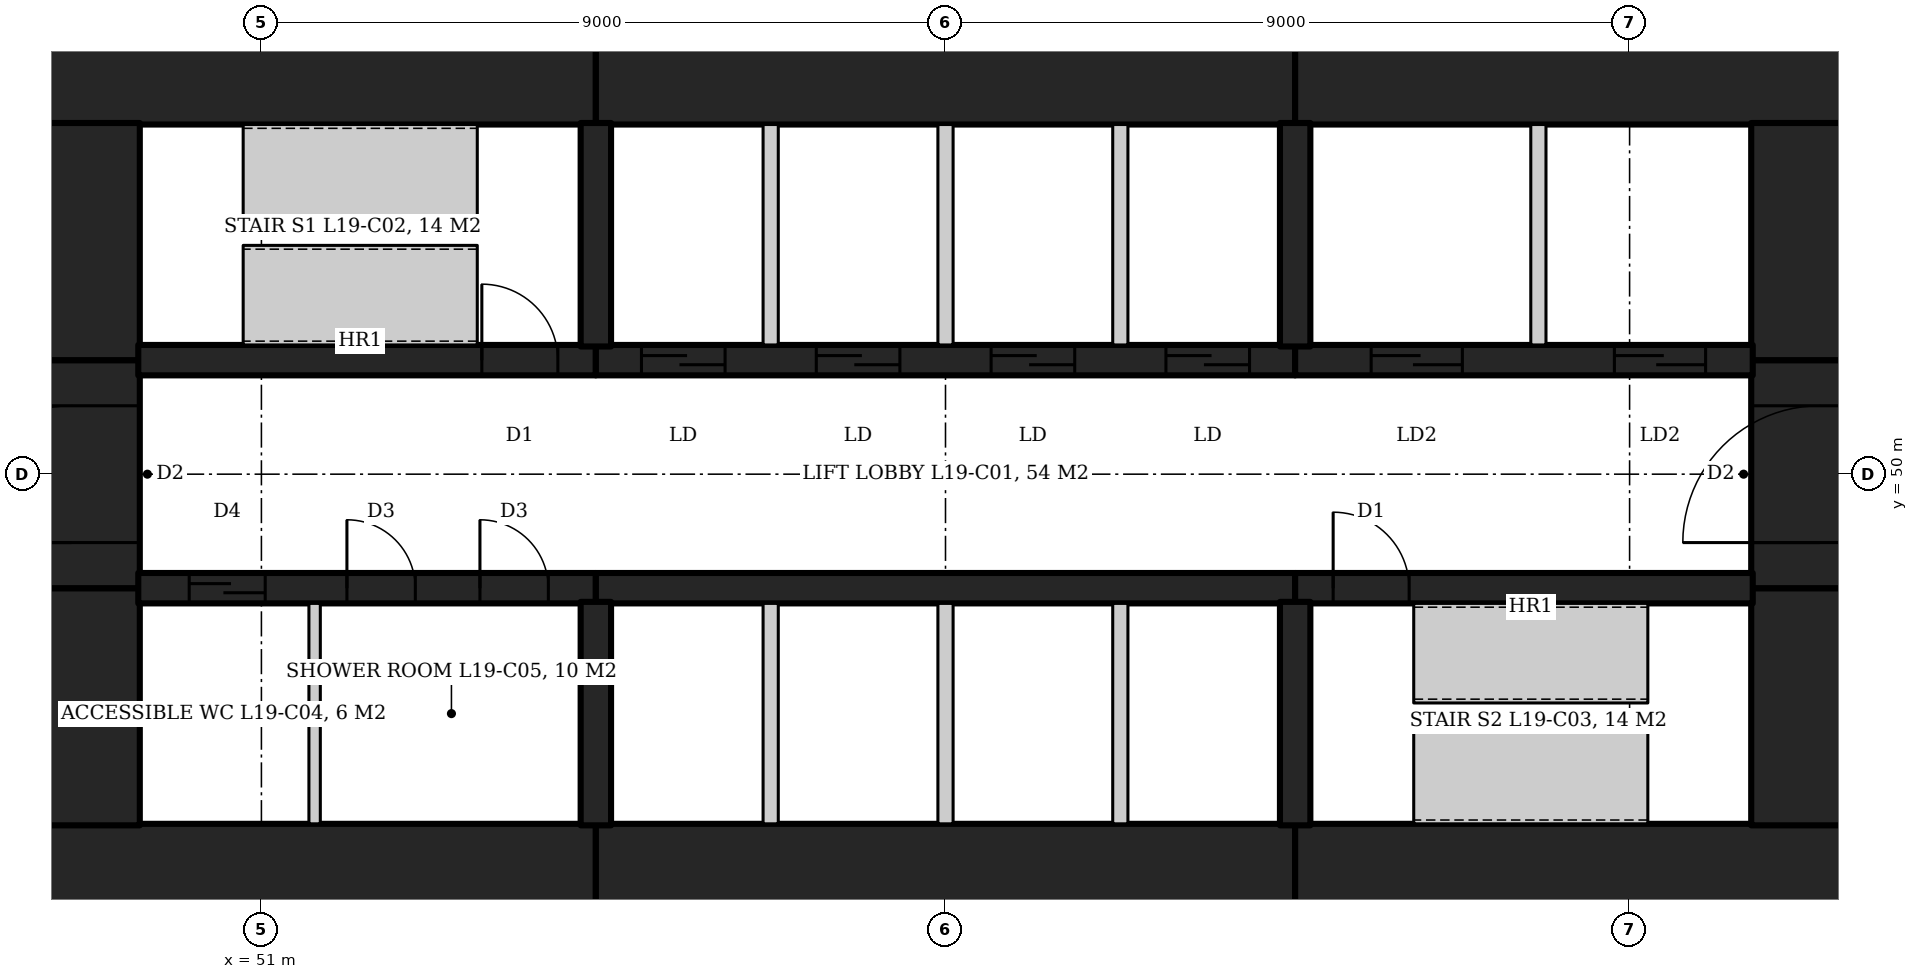
"""IFC4 building model, lengths in metres.
Left out: names, types, materials, properties, quantities, classifications, styles, units other than length and angle.
Written with IfcOpenShell. Run it as: python <this file> out.ifc"""

import sys

from ifc_helpers import new_model, si_unit, direction, frame, frame_2d, origin, place, context, subcontext, project, spatial, rectangle, extrude, element, fill, save


model = new_model("IFC4")
c1 = context("Model", 3, precision=1e-05, world=origin(), true_north=direction((0.0, 1.0)))
c2 = subcontext(c1, "Body", "Model", "MODEL_VIEW")
j1 = project(units=[si_unit("LENGTHUNIT", "METRE"), si_unit("PLANEANGLEUNIT", "RADIAN")], contexts=[c1])
p1 = place(None, origin())
s1 = spatial("IfcSite", under=j1, at=p1, CompositionType="ELEMENT")
p2 = place(p1, origin())
s2 = spatial("IfcBuilding", under=s1, at=p2, CompositionType="ELEMENT")
p3 = place(p2, frame((0.0, 0.0, 80.6)))
s3 = spatial("IfcBuildingStorey", under=s2, at=p3, CompositionType="ELEMENT", Elevation=80.6)
p4 = place(p3, frame((47.6, 55.5, 0.0), z_axis=(0.0, 0.0, 1.0), x_axis=(1.0, 0.0, 0.0)))
e1 = element("IfcWall", 1, at=p4, inside=s3, PredefinedType="SHEAR", context=c2, shape_type="SweptSolid", body=[
    extrude(rectangle(XDim=7.8, YDim=1.8, at=frame_2d((3.9, 0.0))), origin(), (0.0, 0.0, 1.0), 4.2),
])
p5 = place(p3, frame((55.4, 55.5, 0.0), z_axis=(0.0, 0.0, 1.0), x_axis=(1.0, 0.0, 0.0)))
e2 = element("IfcWall", 2, at=p5, inside=s3, PredefinedType="SHEAR", context=c2, shape_type="SweptSolid", body=[
    extrude(rectangle(XDim=9.2, YDim=1.8, at=frame_2d((4.6, 0.0))), origin(), (0.0, 0.0, 1.0), 4.2),
])
for number, where, z_axis, x_axis in (
    (3, (64.6, 55.5, 0.0), (0.0, 0.0, 1.0), (1.0, 0.0, 0.0)),
    (4, (47.6, 44.5, 0.0), (0.0, 0.0, 1.0), (1.0, 0.0, 0.0)),
):
    element("IfcWall", number, at=place(p3, frame(where, z_axis=z_axis, x_axis=x_axis)), inside=s3, PredefinedType="SHEAR", context=c2, shape_type="SweptSolid", body=[
        extrude(rectangle(XDim=7.8, YDim=1.8, at=frame_2d((3.9, 0.0))), origin(), (0.0, 0.0, 1.0), 4.2),
    ])
p6 = place(p3, frame((55.4, 44.5, 0.0), z_axis=(0.0, 0.0, 1.0), x_axis=(1.0, 0.0, 0.0)))
e5 = element("IfcWall", 5, at=p6, inside=s3, PredefinedType="SHEAR", context=c2, shape_type="SweptSolid", body=[
    extrude(rectangle(XDim=9.2, YDim=1.8, at=frame_2d((4.6, 0.0))), origin(), (0.0, 0.0, 1.0), 4.2),
])
p7 = place(p3, frame((64.6, 44.5, 0.0), z_axis=(0.0, 0.0, 1.0), x_axis=(1.0, 0.0, 0.0)))
e6 = element("IfcWall", 6, at=p7, inside=s3, PredefinedType="SHEAR", context=c2, shape_type="SweptSolid", body=[
    extrude(rectangle(XDim=7.8, YDim=1.8, at=frame_2d((3.9, 0.0))), origin(), (0.0, 0.0, 1.0), 4.2),
])
p8 = place(p3, frame((71.5, 45.38, 0.0), z_axis=(0.0, 0.0, 1.0), x_axis=(0.0, 1.0, 0.0)))
e7 = element("IfcWall", 7, at=p8, inside=s3, PredefinedType="SHEAR", context=c2, shape_type="SweptSolid", body=[
    extrude(rectangle(XDim=3.12, YDim=1.8, at=frame_2d((1.56, 0.0))), origin(), (0.0, 0.0, 1.0), 4.2),
])
p9 = place(p3, frame((71.5, 48.5, 0.0), z_axis=(0.0, 0.0, 1.0), x_axis=(0.0, 1.0, 0.0)))
e8 = element("IfcWall", 8, at=p9, inside=s3, PredefinedType="SHEAR", context=c2, shape_type="SweptSolid", body=[
    extrude(rectangle(XDim=3.0, YDim=1.8, at=frame_2d((1.5, 0.0))), origin(), (0.0, 0.0, 1.0), 4.2),
])
p10 = place(p9, frame((0.6, 0.0, 0.0)))
e9 = element("IfcOpeningElement", 9, at=p10, cuts=e8, PredefinedType="OPENING", context=c2, shape_type="SweptSolid", body=[
    extrude(rectangle(XDim=1.8, YDim=2.1, at=frame_2d((0.9, 1.05))), frame((0.0, 0.91, 0.0), z_axis=(0.0, -1.0, 0.0), x_axis=(1.0, 0.0, 0.0)), (0.0, 0.0, 1.0), 1.82),
])
for number, where, z_axis, x_axis in (
    (10, (71.5, 51.5, 0.0), (0.0, 0.0, 1.0), (0.0, 1.0, 0.0)),
    (11, (48.5, 45.38, 0.0), (0.0, 0.0, 1.0), (0.0, 1.0, 0.0)),
):
    element("IfcWall", number, at=place(p3, frame(where, z_axis=z_axis, x_axis=x_axis)), inside=s3, PredefinedType="SHEAR", context=c2, shape_type="SweptSolid", body=[
        extrude(rectangle(XDim=3.12, YDim=1.8, at=frame_2d((1.56, 0.0))), origin(), (0.0, 0.0, 1.0), 4.2),
    ])
p11 = place(p3, frame((48.5, 48.5, 0.0), z_axis=(0.0, 0.0, 1.0), x_axis=(0.0, 1.0, 0.0)))
e12 = element("IfcWall", 12, at=p11, inside=s3, PredefinedType="SHEAR", context=c2, shape_type="SweptSolid", body=[
    extrude(rectangle(XDim=3.0, YDim=1.8, at=frame_2d((1.5, 0.0))), origin(), (0.0, 0.0, 1.0), 4.2),
])
p12 = place(p11, frame((0.6, 0.0, 0.0)))
e13 = element("IfcOpeningElement", 13, at=p12, cuts=e12, PredefinedType="OPENING", context=c2, shape_type="SweptSolid", body=[
    extrude(rectangle(XDim=1.8, YDim=2.1, at=frame_2d((0.9, 1.05))), frame((0.0, 0.91, 0.0), z_axis=(0.0, -1.0, 0.0), x_axis=(1.0, 0.0, 0.0)), (0.0, 0.0, 1.0), 1.82),
])
p13 = place(p3, frame((48.5, 51.5, 0.0), z_axis=(0.0, 0.0, 1.0), x_axis=(0.0, 1.0, 0.0)))
e14 = element("IfcWall", 14, at=p13, inside=s3, PredefinedType="SHEAR", context=c2, shape_type="SweptSolid", body=[
    extrude(rectangle(XDim=3.12, YDim=1.8, at=frame_2d((1.56, 0.0))), origin(), (0.0, 0.0, 1.0), 4.2),
])
p14 = place(p3, frame((49.38, 51.5, 0.0), z_axis=(0.0, 0.0, 1.0), x_axis=(1.0, 0.0, 0.0)))
e15 = element("IfcWall", 15, at=p14, inside=s3, PredefinedType="SHEAR", context=c2, shape_type="SweptSolid", body=[
    extrude(rectangle(XDim=6.02, YDim=0.4, at=frame_2d((3.01, 0.0))), origin(), (0.0, 0.0, 1.0), 4.2),
])
p15 = place(p14, frame((4.52, 0.0, 0.0)))
e16 = element("IfcOpeningElement", 16, at=p15, cuts=e15, PredefinedType="OPENING", context=c2, shape_type="SweptSolid", body=[
    extrude(rectangle(XDim=1.0, YDim=2.1, at=frame_2d((0.5, 1.05))), frame((0.0, 0.21, 0.0), z_axis=(0.0, -1.0, 0.0), x_axis=(1.0, 0.0, 0.0)), (0.0, 0.0, 1.0), 0.42),
])
p16 = place(p3, frame((55.4, 51.5, 0.0), z_axis=(0.0, 0.0, 1.0), x_axis=(1.0, 0.0, 0.0)))
e17 = element("IfcWall", 17, at=p16, inside=s3, PredefinedType="SHEAR", context=c2, shape_type="SweptSolid", body=[
    extrude(rectangle(XDim=9.2, YDim=0.4, at=frame_2d((4.6, 0.0))), origin(), (0.0, 0.0, 1.0), 4.2),
])
p17 = place(p16, frame((0.6, 0.0, 0.0)))
e18 = element("IfcOpeningElement", 18, at=p17, cuts=e17, PredefinedType="OPENING", context=c2, shape_type="SweptSolid", body=[
    extrude(rectangle(XDim=1.1, YDim=2.1, at=frame_2d((0.55, 1.05))), frame((0.0, 0.21, 0.0), z_axis=(0.0, -1.0, 0.0), x_axis=(1.0, 0.0, 0.0)), (0.0, 0.0, 1.0), 0.42),
])
p18 = place(p16, frame((2.9, 0.0, 0.0)))
e19 = element("IfcOpeningElement", 19, at=p18, cuts=e17, PredefinedType="OPENING", context=c2, shape_type="SweptSolid", body=[
    extrude(rectangle(XDim=1.1, YDim=2.1, at=frame_2d((0.55, 1.05))), frame((0.0, 0.21, 0.0), z_axis=(0.0, -1.0, 0.0), x_axis=(1.0, 0.0, 0.0)), (0.0, 0.0, 1.0), 0.42),
])
p19 = place(p16, frame((5.2, 0.0, 0.0)))
e20 = element("IfcOpeningElement", 20, at=p19, cuts=e17, PredefinedType="OPENING", context=c2, shape_type="SweptSolid", body=[
    extrude(rectangle(XDim=1.1, YDim=2.1, at=frame_2d((0.55, 1.05))), frame((0.0, 0.21, 0.0), z_axis=(0.0, -1.0, 0.0), x_axis=(1.0, 0.0, 0.0)), (0.0, 0.0, 1.0), 0.42),
])
p20 = place(p16, frame((7.5, 0.0, 0.0)))
e21 = element("IfcOpeningElement", 21, at=p20, cuts=e17, PredefinedType="OPENING", context=c2, shape_type="SweptSolid", body=[
    extrude(rectangle(XDim=1.1, YDim=2.1, at=frame_2d((0.55, 1.05))), frame((0.0, 0.21, 0.0), z_axis=(0.0, -1.0, 0.0), x_axis=(1.0, 0.0, 0.0)), (0.0, 0.0, 1.0), 0.42),
])
p21 = place(p3, frame((64.6, 51.5, 0.0), z_axis=(0.0, 0.0, 1.0), x_axis=(1.0, 0.0, 0.0)))
e22 = element("IfcWall", 22, at=p21, inside=s3, PredefinedType="SHEAR", context=c2, shape_type="SweptSolid", body=[
    extrude(rectangle(XDim=6.02, YDim=0.4, at=frame_2d((3.01, 0.0))), origin(), (0.0, 0.0, 1.0), 4.2),
])
p22 = place(p21, frame((1.0, 0.0, 0.0)))
e23 = element("IfcOpeningElement", 23, at=p22, cuts=e22, PredefinedType="OPENING", context=c2, shape_type="SweptSolid", body=[
    extrude(rectangle(XDim=1.2, YDim=2.1, at=frame_2d((0.6, 1.05))), frame((0.0, 0.21, 0.0), z_axis=(0.0, -1.0, 0.0), x_axis=(1.0, 0.0, 0.0)), (0.0, 0.0, 1.0), 0.42),
])
p23 = place(p21, frame((4.2, 0.0, 0.0)))
e24 = element("IfcOpeningElement", 24, at=p23, cuts=e22, PredefinedType="OPENING", context=c2, shape_type="SweptSolid", body=[
    extrude(rectangle(XDim=1.2, YDim=2.1, at=frame_2d((0.6, 1.05))), frame((0.0, 0.21, 0.0), z_axis=(0.0, -1.0, 0.0), x_axis=(1.0, 0.0, 0.0)), (0.0, 0.0, 1.0), 0.42),
])
p24 = place(p3, frame((49.38, 48.5, 0.0), z_axis=(0.0, 0.0, 1.0), x_axis=(1.0, 0.0, 0.0)))
e25 = element("IfcWall", 25, at=p24, inside=s3, PredefinedType="SHEAR", context=c2, shape_type="SweptSolid", body=[
    extrude(rectangle(XDim=6.02, YDim=0.4, at=frame_2d((3.01, 0.0))), origin(), (0.0, 0.0, 1.0), 4.2),
])
p25 = place(p24, frame((0.67, 0.0, 0.0)))
e26 = element("IfcOpeningElement", 26, at=p25, cuts=e25, PredefinedType="OPENING", context=c2, shape_type="SweptSolid", body=[
    extrude(rectangle(XDim=1.0, YDim=2.1, at=frame_2d((0.5, 1.05))), frame((0.0, 0.21, 0.0), z_axis=(0.0, -1.0, 0.0), x_axis=(1.0, 0.0, 0.0)), (0.0, 0.0, 1.0), 0.42),
])
p26 = place(p24, frame((2.745, 0.0, 0.0)))
e27 = element("IfcOpeningElement", 27, at=p26, cuts=e25, PredefinedType="OPENING", context=c2, shape_type="SweptSolid", body=[
    extrude(rectangle(XDim=0.9, YDim=2.1, at=frame_2d((0.45, 1.05))), frame((0.0, 0.21, 0.0), z_axis=(0.0, -1.0, 0.0), x_axis=(1.0, 0.0, 0.0)), (0.0, 0.0, 1.0), 0.42),
])
p27 = place(p24, frame((4.495, 0.0, 0.0)))
e28 = element("IfcOpeningElement", 28, at=p27, cuts=e25, PredefinedType="OPENING", context=c2, shape_type="SweptSolid", body=[
    extrude(rectangle(XDim=0.9, YDim=2.1, at=frame_2d((0.45, 1.05))), frame((0.0, 0.21, 0.0), z_axis=(0.0, -1.0, 0.0), x_axis=(1.0, 0.0, 0.0)), (0.0, 0.0, 1.0), 0.42),
])
p28 = place(p3, frame((55.4, 48.5, 0.0), z_axis=(0.0, 0.0, 1.0), x_axis=(1.0, 0.0, 0.0)))
e29 = element("IfcWall", 29, at=p28, inside=s3, PredefinedType="SHEAR", context=c2, shape_type="SweptSolid", body=[
    extrude(rectangle(XDim=9.2, YDim=0.4, at=frame_2d((4.6, 0.0))), origin(), (0.0, 0.0, 1.0), 4.2),
])
p29 = place(p3, frame((64.6, 48.5, 0.0), z_axis=(0.0, 0.0, 1.0), x_axis=(1.0, 0.0, 0.0)))
e30 = element("IfcWall", 30, at=p29, inside=s3, PredefinedType="SHEAR", context=c2, shape_type="SweptSolid", body=[
    extrude(rectangle(XDim=6.02, YDim=0.4, at=frame_2d((3.01, 0.0))), origin(), (0.0, 0.0, 1.0), 4.2),
])
p30 = place(p29, frame((0.5, 0.0, 0.0)))
e31 = element("IfcOpeningElement", 31, at=p30, cuts=e30, PredefinedType="OPENING", context=c2, shape_type="SweptSolid", body=[
    extrude(rectangle(XDim=1.0, YDim=2.1, at=frame_2d((0.5, 1.05))), frame((0.0, 0.21, 0.0), z_axis=(0.0, -1.0, 0.0), x_axis=(1.0, 0.0, 0.0)), (0.0, 0.0, 1.0), 0.42),
])
for number, where, z_axis, x_axis in (
    (32, (55.4, 51.68, 0.0), (0.0, 0.0, 1.0), (0.0, 1.0, 0.0)),
    (33, (64.6, 51.68, 0.0), (0.0, 0.0, 1.0), (0.0, 1.0, 0.0)),
    (34, (55.4, 48.32, 0.0), (0.0, 0.0, 1.0), (0.0, -1.0, 0.0)),
    (35, (64.6, 48.32, 0.0), (0.0, 0.0, 1.0), (0.0, -1.0, 0.0)),
):
    element("IfcWall", number, at=place(p3, frame(where, z_axis=z_axis, x_axis=x_axis)), inside=s3, PredefinedType="SHEAR", context=c2, shape_type="SweptSolid", body=[
        extrude(rectangle(XDim=2.94, YDim=0.4, at=frame_2d((1.47, 0.0))), origin(), (0.0, 0.0, 1.0), 4.2),
    ])
for number, where, z_axis, x_axis in (
    (36, (57.7, 51.7, 0.0), (0.0, 0.0, 1.0), (0.0, 1.0, 0.0)),
    (37, (60.0, 51.7, 0.0), (0.0, 0.0, 1.0), (0.0, 1.0, 0.0)),
    (38, (62.3, 51.7, 0.0), (0.0, 0.0, 1.0), (0.0, 1.0, 0.0)),
    (39, (57.7, 45.4, 0.0), (0.0, 0.0, 1.0), (0.0, 1.0, 0.0)),
    (40, (60.0, 45.4, 0.0), (0.0, 0.0, 1.0), (0.0, 1.0, 0.0)),
    (41, (62.3, 45.4, 0.0), (0.0, 0.0, 1.0), (0.0, 1.0, 0.0)),
    (42, (67.8, 51.7, 0.0), (0.0, 0.0, 1.0), (0.0, 1.0, 0.0)),
):
    element("IfcWall", number, at=place(p3, frame(where, z_axis=z_axis, x_axis=x_axis)), inside=s3, PredefinedType="PARTITIONING", context=c2, shape_type="SweptSolid", body=[
        extrude(rectangle(XDim=2.9, YDim=0.2, at=frame_2d((1.45, 0.0))), origin(), (0.0, 0.0, 1.0), 4.2),
    ])
p31 = place(p3, frame((51.7, 45.4, 0.0), z_axis=(0.0, 0.0, 1.0), x_axis=(0.0, 1.0, 0.0)))
e43 = element("IfcWall", 43, at=p31, inside=s3, PredefinedType="PARTITIONING", context=c2, shape_type="SweptSolid", body=[
    extrude(rectangle(XDim=2.9, YDim=0.15, at=frame_2d((1.45, 0.0))), origin(), (0.0, 0.0, 1.0), 4.04),
])
p32 = place(p15, origin())
e44 = element("IfcDoor", 44, at=p32, inside=s3, OperationType="SINGLE_SWING_LEFT", PredefinedType="DOOR", context=c2, shape_type="SweptSolid", body=[
    extrude(rectangle(XDim=1.0, YDim=2.1, at=frame_2d((0.5, 1.05))), frame((0.0, 0.025, 0.0), z_axis=(0.0, -1.0, 0.0), x_axis=(1.0, 0.0, 0.0)), (0.0, 0.0, 1.0), 0.05),
])
fill(e16, e44)
p33 = place(p30, origin())
e45 = element("IfcDoor", 45, at=p33, inside=s3, OperationType="SINGLE_SWING_LEFT", PredefinedType="DOOR", context=c2, shape_type="SweptSolid", body=[
    extrude(rectangle(XDim=1.0, YDim=2.1, at=frame_2d((0.5, 1.05))), frame((0.0, 0.025, 0.0), z_axis=(0.0, -1.0, 0.0), x_axis=(1.0, 0.0, 0.0)), (0.0, 0.0, 1.0), 0.05),
])
fill(e31, e45)
p34 = place(p22, origin())
e46 = element("IfcDoor", 46, at=p34, inside=s3, OperationType="SLIDING_TO_LEFT", PredefinedType="DOOR", context=c2, shape_type="SweptSolid", body=[
    extrude(rectangle(XDim=1.2, YDim=2.1, at=frame_2d((0.6, 1.05))), frame((0.0, 0.025, 0.0), z_axis=(0.0, -1.0, 0.0), x_axis=(1.0, 0.0, 0.0)), (0.0, 0.0, 1.0), 0.05),
])
fill(e23, e46)
p35 = place(p23, origin())
e47 = element("IfcDoor", 47, at=p35, inside=s3, OperationType="SLIDING_TO_LEFT", PredefinedType="DOOR", context=c2, shape_type="SweptSolid", body=[
    extrude(rectangle(XDim=1.2, YDim=2.1, at=frame_2d((0.6, 1.05))), frame((0.0, 0.025, 0.0), z_axis=(0.0, -1.0, 0.0), x_axis=(1.0, 0.0, 0.0)), (0.0, 0.0, 1.0), 0.05),
])
fill(e24, e47)
p36 = place(p17, origin())
e48 = element("IfcDoor", 48, at=p36, inside=s3, OperationType="SLIDING_TO_LEFT", PredefinedType="DOOR", context=c2, shape_type="SweptSolid", body=[
    extrude(rectangle(XDim=1.1, YDim=2.1, at=frame_2d((0.55, 1.05))), frame((0.0, 0.025, 0.0), z_axis=(0.0, -1.0, 0.0), x_axis=(1.0, 0.0, 0.0)), (0.0, 0.0, 1.0), 0.05),
])
fill(e18, e48)
p37 = place(p18, origin())
e49 = element("IfcDoor", 49, at=p37, inside=s3, OperationType="SLIDING_TO_LEFT", PredefinedType="DOOR", context=c2, shape_type="SweptSolid", body=[
    extrude(rectangle(XDim=1.1, YDim=2.1, at=frame_2d((0.55, 1.05))), frame((0.0, 0.025, 0.0), z_axis=(0.0, -1.0, 0.0), x_axis=(1.0, 0.0, 0.0)), (0.0, 0.0, 1.0), 0.05),
])
fill(e19, e49)
p38 = place(p19, origin())
e50 = element("IfcDoor", 50, at=p38, inside=s3, OperationType="SLIDING_TO_LEFT", PredefinedType="DOOR", context=c2, shape_type="SweptSolid", body=[
    extrude(rectangle(XDim=1.1, YDim=2.1, at=frame_2d((0.55, 1.05))), frame((0.0, 0.025, 0.0), z_axis=(0.0, -1.0, 0.0), x_axis=(1.0, 0.0, 0.0)), (0.0, 0.0, 1.0), 0.05),
])
fill(e20, e50)
p39 = place(p20, origin())
e51 = element("IfcDoor", 51, at=p39, inside=s3, OperationType="SLIDING_TO_LEFT", PredefinedType="DOOR", context=c2, shape_type="SweptSolid", body=[
    extrude(rectangle(XDim=1.1, YDim=2.1, at=frame_2d((0.55, 1.05))), frame((0.0, 0.025, 0.0), z_axis=(0.0, -1.0, 0.0), x_axis=(1.0, 0.0, 0.0)), (0.0, 0.0, 1.0), 0.05),
])
fill(e21, e51)
p40 = place(p25, origin())
e52 = element("IfcDoor", 52, at=p40, inside=s3, OperationType="SLIDING_TO_LEFT", PredefinedType="DOOR", context=c2, shape_type="SweptSolid", body=[
    extrude(rectangle(XDim=1.0, YDim=2.1, at=frame_2d((0.5, 1.05))), frame((0.0, 0.025, 0.0), z_axis=(0.0, -1.0, 0.0), x_axis=(1.0, 0.0, 0.0)), (0.0, 0.0, 1.0), 0.05),
])
fill(e26, e52)
p41 = place(p26, origin())
e53 = element("IfcDoor", 53, at=p41, inside=s3, OperationType="SINGLE_SWING_RIGHT", PredefinedType="DOOR", context=c2, shape_type="SweptSolid", body=[
    extrude(rectangle(XDim=0.9, YDim=2.1, at=frame_2d((0.45, 1.05))), frame((0.0, 0.025, 0.0), z_axis=(0.0, -1.0, 0.0), x_axis=(1.0, 0.0, 0.0)), (0.0, 0.0, 1.0), 0.05),
])
fill(e27, e53)
p42 = place(p27, origin())
e54 = element("IfcDoor", 54, at=p42, inside=s3, OperationType="SINGLE_SWING_RIGHT", PredefinedType="DOOR", context=c2, shape_type="SweptSolid", body=[
    extrude(rectangle(XDim=0.9, YDim=2.1, at=frame_2d((0.45, 1.05))), frame((0.0, 0.025, 0.0), z_axis=(0.0, -1.0, 0.0), x_axis=(1.0, 0.0, 0.0)), (0.0, 0.0, 1.0), 0.05),
])
fill(e28, e54)
p43 = place(p10, origin())
e55 = element("IfcDoor", 55, at=p43, inside=s3, OperationType="DOUBLE_DOOR_DOUBLE_SWING", PredefinedType="DOOR", context=c2, shape_type="SweptSolid", body=[
    extrude(rectangle(XDim=1.8, YDim=2.1, at=frame_2d((0.9, 1.05))), frame((0.0, 0.025, 0.0), z_axis=(0.0, -1.0, 0.0), x_axis=(1.0, 0.0, 0.0)), (0.0, 0.0, 1.0), 0.05),
])
fill(e9, e55)
p44 = place(p12, origin())
e56 = element("IfcDoor", 56, at=p44, inside=s3, OperationType="DOUBLE_DOOR_DOUBLE_SWING", PredefinedType="DOOR", context=c2, shape_type="SweptSolid", body=[
    extrude(rectangle(XDim=1.8, YDim=2.1, at=frame_2d((0.9, 1.05))), frame((0.0, 0.025, 0.0), z_axis=(0.0, -1.0, 0.0), x_axis=(1.0, 0.0, 0.0)), (0.0, 0.0, 1.0), 0.05),
])
fill(e13, e56)
save(model, sys.argv[1])
